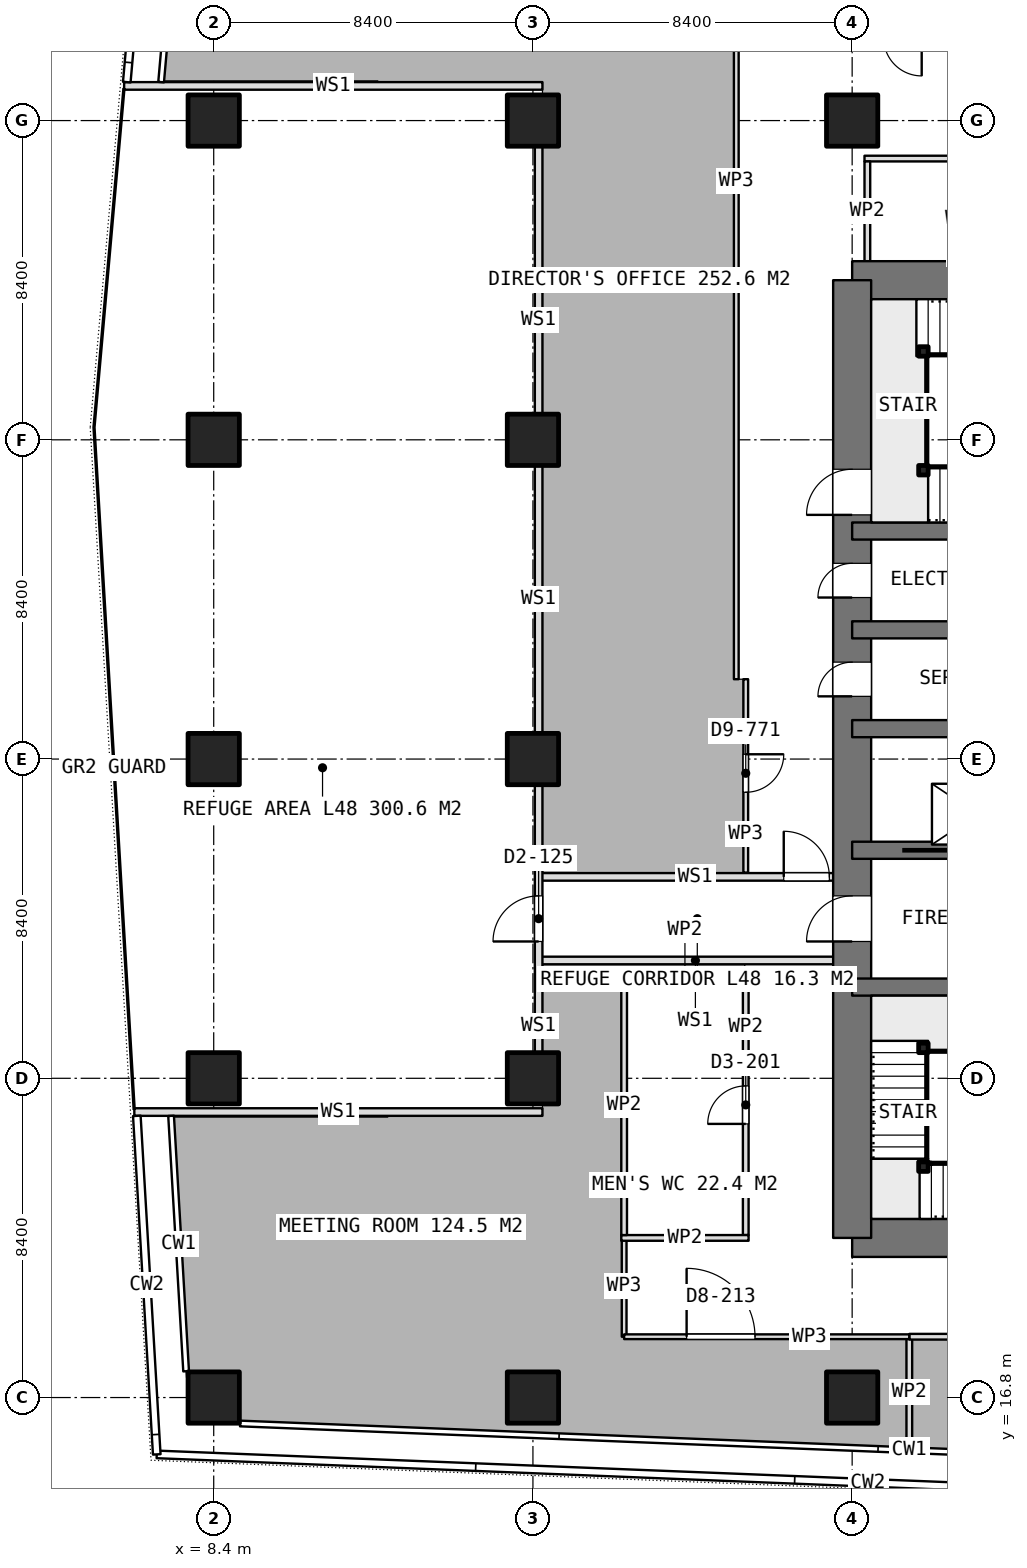
"""IFC4 building model, lengths in metres.
Left out: names, types, materials, properties, quantities, classifications, styles, units other than length and angle.
Written with IfcOpenShell. Run it as: python <this file> out.ifc"""

import sys

from ifc_helpers import new_model, si_unit, direction, frame, frame_2d, origin, origin_2d, place, context, subcontext, project, spatial, rectangle, extrude, element, fill, save


model = new_model("IFC4")
c1 = context("Model", 3, precision=1e-05, world=origin(), true_north=direction((0.0, 1.0)))
c2 = subcontext(c1, "Body", "Model", "MODEL_VIEW")
j1 = project(units=[si_unit("LENGTHUNIT", "METRE"), si_unit("PLANEANGLEUNIT", "RADIAN")], contexts=[c1])
p1 = place(None, origin())
s1 = spatial("IfcSite", under=j1, at=p1, CompositionType="ELEMENT")
p2 = place(p1, origin())
s2 = spatial("IfcBuilding", under=s1, at=p2, CompositionType="ELEMENT")
p3 = place(p2, frame((0.0, 0.0, 191.45)))
s3 = spatial("IfcBuildingStorey", under=s2, at=p3, CompositionType="ELEMENT", Elevation=191.45)
for number, where, z_axis, x_axis in (
    (1, (25.2, 21.0, 0.0), (0.0, 0.0, 1.0), (1.0, 0.0, 0.0)),
    (2, (25.2, 46.2, 0.0), (0.0, 0.0, 1.0), (1.0, 0.0, 0.0)),
):
    element("IfcWall", number, at=place(p3, frame(where, z_axis=z_axis, x_axis=x_axis)), inside=s3, PredefinedType="SHEAR", context=c2, shape_type="SweptSolid", body=[
        extrude(rectangle(XDim=10.4, YDim=1.0, at=frame_2d((5.2, 0.0))), origin(), (0.0, 0.0, 1.0), 3.75),
    ])
p4 = place(p3, frame((25.2, 21.0, 0.0), z_axis=(0.0, 0.0, 1.0), x_axis=(0.0, 1.0, 0.0)))
e3 = element("IfcWall", 3, at=p4, inside=s3, PredefinedType="SHEAR", context=c2, shape_type="SweptSolid", body=[
    extrude(rectangle(XDim=25.2, YDim=1.0, at=frame_2d((12.6, 0.0))), origin(), (0.0, 0.0, 1.0), 3.75),
])
p5 = place(p4, frame((7.8, 0.0, 0.0)))
e4 = element("IfcOpeningElement", 4, at=p5, cuts=e3, PredefinedType="OPENING", context=c2, shape_type="SweptSolid", body=[
    extrude(rectangle(XDim=1.2, YDim=2.1, at=frame_2d((0.6, 1.05))), frame((0.0, 0.51, 0.0), z_axis=(0.0, -1.0, 0.0), x_axis=(1.0, 0.0, 0.0)), (0.0, 0.0, 1.0), 1.02),
])
p6 = place(p4, frame((14.25, 0.0, 0.0)))
e5 = element("IfcOpeningElement", 5, at=p6, cuts=e3, PredefinedType="OPENING", context=c2, shape_type="SweptSolid", body=[
    extrude(rectangle(XDim=0.9, YDim=2.1, at=frame_2d((0.45, 1.05))), frame((0.0, 0.51, 0.0), z_axis=(0.0, -1.0, 0.0), x_axis=(1.0, 0.0, 0.0)), (0.0, 0.0, 1.0), 1.02),
])
p7 = place(p4, frame((16.85, 0.0, 0.0)))
e6 = element("IfcOpeningElement", 6, at=p7, cuts=e3, PredefinedType="OPENING", context=c2, shape_type="SweptSolid", body=[
    extrude(rectangle(XDim=0.9, YDim=2.1, at=frame_2d((0.45, 1.05))), frame((0.0, 0.51, 0.0), z_axis=(0.0, -1.0, 0.0), x_axis=(1.0, 0.0, 0.0)), (0.0, 0.0, 1.0), 1.02),
])
p8 = place(p4, frame((19.025, 0.0, 0.0)))
e7 = element("IfcOpeningElement", 7, at=p8, cuts=e3, PredefinedType="OPENING", context=c2, shape_type="SweptSolid", body=[
    extrude(rectangle(XDim=1.2, YDim=2.1, at=frame_2d((0.6, 1.05))), frame((0.0, 0.51, 0.0), z_axis=(0.0, -1.0, 0.0), x_axis=(1.0, 0.0, 0.0)), (0.0, 0.0, 1.0), 1.02),
])
p9 = place(p3, frame((25.2, 27.6, 0.0), z_axis=(0.0, 0.0, 1.0), x_axis=(1.0, 0.0, 0.0)))
e8 = element("IfcWall", 8, at=p9, inside=s3, PredefinedType="SHEAR", context=c2, shape_type="SweptSolid", body=[
    extrude(rectangle(XDim=6.6, YDim=0.45, at=frame_2d((3.3, 0.0))), origin(), (0.0, 0.0, 1.0), 3.75),
])
p10 = place(p9, frame((4.975, 0.0, 0.0)))
e9 = element("IfcOpeningElement", 9, at=p10, cuts=e8, PredefinedType="OPENING", context=c2, shape_type="SweptSolid", body=[
    extrude(rectangle(XDim=1.2, YDim=2.1, at=frame_2d((0.6, 1.05))), frame((0.0, 0.235, 0.0), z_axis=(0.0, -1.0, 0.0), x_axis=(1.0, 0.0, 0.0)), (0.0, 0.0, 1.0), 0.47),
])
p11 = place(p3, frame((25.2, 31.2, 0.0), z_axis=(0.0, 0.0, 1.0), x_axis=(1.0, 0.0, 0.0)))
e10 = element("IfcWall", 10, at=p11, inside=s3, PredefinedType="SHEAR", context=c2, shape_type="SweptSolid", body=[
    extrude(rectangle(XDim=6.6, YDim=0.45, at=frame_2d((3.3, 0.0))), origin(), (0.0, 0.0, 1.0), 3.75),
])
p12 = place(p11, frame((2.65, 0.0, 0.0)))
e11 = element("IfcOpeningElement", 11, at=p12, cuts=e10, PredefinedType="OPENING", context=c2, shape_type="SweptSolid", body=[
    extrude(rectangle(XDim=1.3, YDim=2.1, at=frame_2d((0.65, 1.05))), frame((0.0, 0.235, 0.0), z_axis=(0.0, -1.0, 0.0), x_axis=(1.0, 0.0, 0.0)), (0.0, 0.0, 1.0), 0.47),
])
for number, where, z_axis, x_axis in (
    (12, (25.2, 34.4, 0.0), (0.0, 0.0, 1.0), (1.0, 0.0, 0.0)),
    (13, (25.2, 37.0, 0.0), (0.0, 0.0, 1.0), (1.0, 0.0, 0.0)),
    (14, (25.2, 39.6, 0.0), (0.0, 0.0, 1.0), (1.0, 0.0, 0.0)),
):
    element("IfcWall", number, at=place(p3, frame(where, z_axis=z_axis, x_axis=x_axis)), inside=s3, PredefinedType="SHEAR", context=c2, shape_type="SweptSolid", body=[
        extrude(rectangle(XDim=6.6, YDim=0.45, at=frame_2d((3.3, 0.0))), origin(), (0.0, 0.0, 1.0), 3.75),
    ])
for number, where, z_axis, x_axis in (
    (15, (8.4, 16.8, 0.0), (0.0, 0.0, 1.0), (1.0, 0.0, 0.0)),
    (16, (8.4, 25.2, 0.0), (0.0, 0.0, 1.0), (1.0, 0.0, 0.0)),
    (17, (8.4, 33.6, 0.0), (0.0, 0.0, 1.0), (1.0, 0.0, 0.0)),
    (18, (8.4, 42.0, 0.0), (0.0, 0.0, 1.0), (1.0, 0.0, 0.0)),
    (19, (8.4, 50.4, 0.0), (0.0, 0.0, 1.0), (1.0, 0.0, 0.0)),
    (20, (16.8, 16.8, 0.0), (0.0, 0.0, 1.0), (1.0, 0.0, 0.0)),
    (21, (16.8, 25.2, 0.0), (0.0, 0.0, 1.0), (1.0, 0.0, 0.0)),
    (22, (16.8, 33.6, 0.0), (0.0, 0.0, 1.0), (1.0, 0.0, 0.0)),
    (23, (16.8, 42.0, 0.0), (0.0, 0.0, 1.0), (1.0, 0.0, 0.0)),
    (24, (16.8, 50.4, 0.0), (0.0, 0.0, 1.0), (1.0, 0.0, 0.0)),
    (25, (25.2, 16.8, 0.0), (0.0, 0.0, 1.0), (1.0, 0.0, 0.0)),
    (26, (25.2, 50.4, 0.0), (0.0, 0.0, 1.0), (1.0, 0.0, 0.0)),
):
    element("IfcColumn", number, at=place(p3, frame(where, z_axis=z_axis, x_axis=x_axis)), inside=s3, PredefinedType="COLUMN", context=c2, shape_type="SweptSolid", body=[
        extrude(rectangle(XDim=1.35, YDim=1.35, at=origin_2d()), origin(), (0.0, 0.0, 1.0), 3.75),
    ])
p13 = place(p3, frame((25.525, 49.4, 0.0), z_axis=(0.0, 0.0, 1.0), x_axis=(1.0, 0.0, 0.0)))
e27 = element("IfcWall", 27, at=p13, inside=s3, PredefinedType="PARTITIONING", context=c2, shape_type="SweptSolid", body=[
    extrude(rectangle(XDim=9.75, YDim=0.15, at=frame_2d((4.875, 0.0))), origin(), (0.0, 0.0, 1.0), 3.5),
])
p14 = place(p13, frame((4.375, 0.0, 0.0)))
e28 = element("IfcOpeningElement", 28, at=p14, cuts=e27, PredefinedType="OPENING", context=c2, shape_type="SweptSolid", body=[
    extrude(rectangle(XDim=1.0, YDim=2.1, at=frame_2d((0.5, 1.05))), frame((0.0, 0.085, 0.0), z_axis=(0.0, -1.0, 0.0), x_axis=(1.0, 0.0, 0.0)), (0.0, 0.0, 1.0), 0.17),
])
p15 = place(p3, frame((25.6, 46.7, 0.0), z_axis=(0.0, 0.0, 1.0), x_axis=(0.0, 1.0, 0.0)))
e29 = element("IfcWall", 29, at=p15, inside=s3, PredefinedType="PARTITIONING", context=c2, shape_type="SweptSolid", body=[
    extrude(rectangle(XDim=2.625, YDim=0.15, at=frame_2d((1.312, 0.0))), origin(), (0.0, 0.0, 1.0), 3.5),
])
for number, where, z_axis, x_axis in (
    (30, (19.125, 21.0, 0.0), (0.0, 0.0, 1.0), (1.0, 0.0, 0.0)),
    (31, (19.125, 28.0, 0.0), (0.0, 0.0, 1.0), (1.0, 0.0, 0.0)),
):
    element("IfcWall", number, at=place(p3, frame(where, z_axis=z_axis, x_axis=x_axis)), inside=s3, PredefinedType="PARTITIONING", context=c2, shape_type="SweptSolid", body=[
        extrude(rectangle(XDim=3.35, YDim=0.15, at=frame_2d((1.675, 0.0))), origin(), (0.0, 0.0, 1.0), 3.5),
    ])
p16 = place(p3, frame((19.2, 21.075, 0.0), z_axis=(0.0, 0.0, 1.0), x_axis=(0.0, 1.0, 0.0)))
e32 = element("IfcWall", 32, at=p16, inside=s3, PredefinedType="PARTITIONING", context=c2, shape_type="SweptSolid", body=[
    extrude(rectangle(XDim=6.85, YDim=0.15, at=frame_2d((3.425, 0.0))), origin(), (0.0, 0.0, 1.0), 3.5),
])
p17 = place(p3, frame((22.4, 21.075, 0.0), z_axis=(0.0, 0.0, 1.0), x_axis=(0.0, 1.0, 0.0)))
e33 = element("IfcWall", 33, at=p17, inside=s3, PredefinedType="PARTITIONING", context=c2, shape_type="SweptSolid", body=[
    extrude(rectangle(XDim=6.85, YDim=0.15, at=frame_2d((3.425, 0.0))), origin(), (0.0, 0.0, 1.0), 3.5),
])
p18 = place(p17, frame((2.925, 0.0, 0.0)))
e34 = element("IfcOpeningElement", 34, at=p18, cuts=e33, PredefinedType="OPENING", context=c2, shape_type="SweptSolid", body=[
    extrude(rectangle(XDim=1.0, YDim=2.1, at=frame_2d((0.5, 1.05))), frame((0.0, 0.085, 0.0), z_axis=(0.0, -1.0, 0.0), x_axis=(1.0, 0.0, 0.0)), (0.0, 0.0, 1.0), 0.17),
])
p19 = place(p3, frame((22.151, 55.88, 0.0), z_axis=(0.0, 0.0, 1.0), x_axis=(0.0, -1.0, 0.0)))
e35 = element("IfcWall", 35, at=p19, inside=s3, PredefinedType="PARTITIONING", context=c2, shape_type="SweptSolid", body=[
    extrude(rectangle(XDim=20.179, YDim=0.125, at=frame_2d((10.089, 0.0))), origin(), (0.0, 0.0, 1.0), 3.5),
])
p20 = place(p3, frame((22.4, 35.701, 0.0), z_axis=(0.0, 0.0, 1.0), x_axis=(0.0, -1.0, 0.0)))
e36 = element("IfcWall", 36, at=p20, inside=s3, PredefinedType="PARTITIONING", context=c2, shape_type="SweptSolid", body=[
    extrude(rectangle(XDim=5.09, YDim=0.125, at=frame_2d((2.545, 0.0))), origin(), (0.0, 0.0, 1.0), 3.5),
])
p21 = place(p20, frame((1.975, 0.0, 0.0)))
e37 = element("IfcOpeningElement", 37, at=p21, cuts=e36, PredefinedType="OPENING", context=c2, shape_type="SweptSolid", body=[
    extrude(rectangle(XDim=1.0, YDim=2.1, at=frame_2d((0.5, 1.05))), frame((0.0, 0.073, 0.0), z_axis=(0.0, -1.0, 0.0), x_axis=(1.0, 0.0, 0.0)), (0.0, 0.0, 1.0), 0.145),
])
p22 = place(p3, frame((26.704, 15.495, 0.0), z_axis=(0.0, 0.0, 1.0), x_axis=(0.0, 1.0, 0.0)))
e38 = element("IfcWall", 38, at=p22, inside=s3, PredefinedType="PARTITIONING", context=c2, shape_type="SweptSolid", body=[
    extrude(rectangle(XDim=2.905, YDim=0.15, at=frame_2d((1.452, 0.0))), origin(), (0.0, 0.0, 1.0), 3.5),
])
p23 = place(p3, frame((26.704, 18.4, 0.0), z_axis=(0.0, 0.0, 1.0), x_axis=(1.0, 0.0, 0.0)))
e39 = element("IfcWall", 39, at=p23, inside=s3, PredefinedType="PARTITIONING", context=c2, shape_type="SweptSolid", body=[
    extrude(rectangle(XDim=8.495, YDim=0.15, at=frame_2d((4.248, 0.0))), origin(), (0.0, 0.0, 1.0), 3.5),
])
p24 = place(p23, frame((3.747, 0.0, 0.0)))
e40 = element("IfcOpeningElement", 40, at=p24, cuts=e39, PredefinedType="OPENING", context=c2, shape_type="SweptSolid", body=[
    extrude(rectangle(XDim=1.0, YDim=2.1, at=frame_2d((0.5, 1.05))), frame((0.0, 0.085, 0.0), z_axis=(0.0, -1.0, 0.0), x_axis=(1.0, 0.0, 0.0)), (0.0, 0.0, 1.0), 0.17),
])
p25 = place(p3, frame((19.2, 21.075, 0.0), z_axis=(0.0, 0.0, 1.0), x_axis=(0.0, -1.0, 0.0)))
e41 = element("IfcWall", 41, at=p25, inside=s3, PredefinedType="PARTITIONING", context=c2, shape_type="SweptSolid", body=[
    extrude(rectangle(XDim=2.675, YDim=0.125, at=frame_2d((1.337, 0.0))), origin(), (0.0, 0.0, 1.0), 3.5),
])
p26 = place(p3, frame((19.2, 18.4, 0.0), z_axis=(0.0, 0.0, 1.0), x_axis=(1.0, 0.0, 0.0)))
e42 = element("IfcWall", 42, at=p26, inside=s3, PredefinedType="PARTITIONING", context=c2, shape_type="SweptSolid", body=[
    extrude(rectangle(XDim=7.503, YDim=0.125, at=frame_2d((3.751, 0.0))), origin(), (0.0, 0.0, 1.0), 3.5),
])
p27 = place(p26, frame((1.644, 0.0, 0.0)))
e43 = element("IfcOpeningElement", 43, at=p27, cuts=e42, PredefinedType="OPENING", context=c2, shape_type="SweptSolid", body=[
    extrude(rectangle(XDim=1.8, YDim=2.1, at=frame_2d((0.9, 1.05))), frame((0.0, 0.073, 0.0), z_axis=(0.0, -1.0, 0.0), x_axis=(1.0, 0.0, 0.0)), (0.0, 0.0, 1.0), 0.145),
])
for number, where, z_axis, x_axis in (
    (44, (27.075, 22.875, 0.0), (0.0, 0.0, 1.0), (1.0, 0.0, 0.0)),
    (45, (27.075, 26.0, 0.0), (0.0, 0.0, 1.0), (1.0, 0.0, 0.0)),
    (46, (27.075, 41.2, 0.0), (0.0, 0.0, 1.0), (1.0, 0.0, 0.0)),
    (47, (27.075, 44.325, 0.0), (0.0, 0.0, 1.0), (1.0, 0.0, 0.0)),
):
    element("IfcColumn", number, at=place(p3, frame(where, z_axis=z_axis, x_axis=x_axis)), inside=s3, PredefinedType="COLUMN", context=c2, shape_type="SweptSolid", body=[
        extrude(rectangle(XDim=0.25, YDim=0.25, at=origin_2d()), origin(), (0.0, 0.0, 1.0), 3.75),
    ])
p28 = place(p3, frame((16.95, 25.875, 0.0), z_axis=(0.0, 0.0, 1.0), x_axis=(0.0, 1.0, 0.0)))
e48 = element("IfcWall", 48, at=p28, inside=s3, PredefinedType="PARTITIONING", context=c2, shape_type="SweptSolid", body=[
    extrude(rectangle(XDim=7.05, YDim=0.2, at=frame_2d((3.525, 0.0))), origin(), (0.0, 0.0, 1.0), 3.5),
])
p29 = place(p28, frame((2.925, 0.0, 0.0)))
e49 = element("IfcOpeningElement", 49, at=p29, cuts=e48, PredefinedType="OPENING", context=c2, shape_type="SweptSolid", body=[
    extrude(rectangle(XDim=1.2, YDim=2.1, at=frame_2d((0.6, 1.05))), frame((0.0, 0.11, 0.0), z_axis=(0.0, -1.0, 0.0), x_axis=(1.0, 0.0, 0.0)), (0.0, 0.0, 1.0), 0.22),
])
for number, where, z_axis, x_axis in (
    (50, (16.95, 34.275, 0.0), (0.0, 0.0, 1.0), (0.0, 1.0, 0.0)),
    (51, (16.95, 42.675, 0.0), (0.0, 0.0, 1.0), (0.0, 1.0, 0.0)),
):
    element("IfcWall", number, at=place(p3, frame(where, z_axis=z_axis, x_axis=x_axis)), inside=s3, PredefinedType="PARTITIONING", context=c2, shape_type="SweptSolid", body=[
        extrude(rectangle(XDim=7.05, YDim=0.2, at=frame_2d((3.525, 0.0))), origin(), (0.0, 0.0, 1.0), 3.5),
    ])
p30 = place(p3, frame((6.311, 24.312, 0.0), z_axis=(0.0, 0.0, 1.0), x_axis=(1.0, 0.0, 0.0)))
e52 = element("IfcWall", 52, at=p30, inside=s3, PredefinedType="PARTITIONING", context=c2, shape_type="SweptSolid", body=[
    extrude(rectangle(XDim=10.739, YDim=0.2, at=frame_2d((5.37, 0.0))), origin(), (0.0, 0.0, 1.0), 3.5),
])
p31 = place(p3, frame((6.043, 51.312, 0.0), z_axis=(0.0, 0.0, 1.0), x_axis=(1.0, 0.0, 0.0)))
e53 = element("IfcWall", 53, at=p31, inside=s3, PredefinedType="PARTITIONING", context=c2, shape_type="SweptSolid", body=[
    extrude(rectangle(XDim=11.007, YDim=0.2, at=frame_2d((5.503, 0.0))), origin(), (0.0, 0.0, 1.0), 3.5),
])
p32 = place(p3, frame((16.95, 30.5, 0.0), z_axis=(0.0, 0.0, 1.0), x_axis=(1.0, 0.0, 0.0)))
e54 = element("IfcWall", 54, at=p32, inside=s3, PredefinedType="PARTITIONING", context=c2, shape_type="SweptSolid", body=[
    extrude(rectangle(XDim=8.25, YDim=0.2, at=frame_2d((4.125, 0.0))), origin(), (0.0, 0.0, 1.0), 3.5),
])
p33 = place(p32, frame((6.45, 0.0, 0.0)))
e55 = element("IfcOpeningElement", 55, at=p33, cuts=e54, PredefinedType="OPENING", context=c2, shape_type="SweptSolid", body=[
    extrude(rectangle(XDim=1.2, YDim=2.1, at=frame_2d((0.6, 1.05))), frame((0.0, 0.11, 0.0), z_axis=(0.0, -1.0, 0.0), x_axis=(1.0, 0.0, 0.0)), (0.0, 0.0, 1.0), 0.22),
])
p34 = place(p3, frame((16.95, 28.3, 0.0), z_axis=(0.0, 0.0, 1.0), x_axis=(1.0, 0.0, 0.0)))
e56 = element("IfcWall", 56, at=p34, inside=s3, PredefinedType="PARTITIONING", context=c2, shape_type="SweptSolid", body=[
    extrude(rectangle(XDim=8.25, YDim=0.2, at=frame_2d((4.125, 0.0))), origin(), (0.0, 0.0, 1.0), 3.5),
])
p35 = place(p5, origin())
e57 = element("IfcDoor", 57, at=p35, inside=s3, OperationType="SINGLE_SWING_LEFT", PredefinedType="DOOR", context=c2, shape_type="SweptSolid", body=[
    extrude(rectangle(XDim=1.2, YDim=2.1, at=frame_2d((0.6, 1.05))), frame((0.0, 0.025, 0.0), z_axis=(0.0, -1.0, 0.0), x_axis=(1.0, 0.0, 0.0)), (0.0, 0.0, 1.0), 0.05),
])
fill(e4, e57)
p36 = place(p6, origin())
e58 = element("IfcDoor", 58, at=p36, inside=s3, OperationType="SINGLE_SWING_LEFT", PredefinedType="DOOR", context=c2, shape_type="SweptSolid", body=[
    extrude(rectangle(XDim=0.9, YDim=2.1, at=frame_2d((0.45, 1.05))), frame((0.0, 0.025, 0.0), z_axis=(0.0, -1.0, 0.0), x_axis=(1.0, 0.0, 0.0)), (0.0, 0.0, 1.0), 0.05),
])
fill(e5, e58)
p37 = place(p7, origin())
e59 = element("IfcDoor", 59, at=p37, inside=s3, OperationType="SINGLE_SWING_LEFT", PredefinedType="DOOR", context=c2, shape_type="SweptSolid", body=[
    extrude(rectangle(XDim=0.9, YDim=2.1, at=frame_2d((0.45, 1.05))), frame((0.0, 0.025, 0.0), z_axis=(0.0, -1.0, 0.0), x_axis=(1.0, 0.0, 0.0)), (0.0, 0.0, 1.0), 0.05),
])
fill(e6, e59)
p38 = place(p18, origin())
e60 = element("IfcDoor", 60, at=p38, inside=s3, OperationType="SINGLE_SWING_LEFT", PredefinedType="DOOR", context=c2, shape_type="SweptSolid", body=[
    extrude(rectangle(XDim=1.0, YDim=2.1, at=frame_2d((0.5, 1.05))), frame((0.0, 0.025, 0.0), z_axis=(0.0, -1.0, 0.0), x_axis=(1.0, 0.0, 0.0)), (0.0, 0.0, 1.0), 0.05),
])
fill(e34, e60)
p39 = place(p21, origin())
e61 = element("IfcDoor", 61, at=p39, inside=s3, OperationType="SINGLE_SWING_LEFT", PredefinedType="DOOR", context=c2, shape_type="SweptSolid", body=[
    extrude(rectangle(XDim=1.0, YDim=2.1, at=frame_2d((0.5, 1.05))), frame((0.0, 0.025, 0.0), z_axis=(0.0, -1.0, 0.0), x_axis=(1.0, 0.0, 0.0)), (0.0, 0.0, 1.0), 0.05),
])
fill(e37, e61)
p40 = place(p27, origin())
e62 = element("IfcDoor", 62, at=p40, inside=s3, OperationType="DOUBLE_DOOR_SINGLE_SWING", PredefinedType="DOOR", context=c2, shape_type="SweptSolid", body=[
    extrude(rectangle(XDim=1.8, YDim=2.1, at=frame_2d((0.9, 1.05))), frame((0.0, 0.025, 0.0), z_axis=(0.0, -1.0, 0.0), x_axis=(1.0, 0.0, 0.0)), (0.0, 0.0, 1.0), 0.05),
])
fill(e43, e62)
p41 = place(p8, origin())
e63 = element("IfcDoor", 63, at=p41, inside=s3, OperationType="SINGLE_SWING_RIGHT", PredefinedType="DOOR", context=c2, shape_type="SweptSolid", body=[
    extrude(rectangle(XDim=1.2, YDim=2.1, at=frame_2d((0.6, 1.05))), frame((0.0, 0.025, 0.0), z_axis=(0.0, -1.0, 0.0), x_axis=(1.0, 0.0, 0.0)), (0.0, 0.0, 1.0), 0.05),
])
fill(e7, e63)
p42 = place(p29, origin())
e64 = element("IfcDoor", 64, at=p42, inside=s3, OperationType="SINGLE_SWING_LEFT", PredefinedType="DOOR", context=c2, shape_type="SweptSolid", body=[
    extrude(rectangle(XDim=1.2, YDim=2.1, at=frame_2d((0.6, 1.05))), frame((0.0, 0.025, 0.0), z_axis=(0.0, -1.0, 0.0), x_axis=(1.0, 0.0, 0.0)), (0.0, 0.0, 1.0), 0.05),
])
fill(e49, e64)
p43 = place(p33, origin())
e65 = element("IfcDoor", 65, at=p43, inside=s3, OperationType="SINGLE_SWING_LEFT", PredefinedType="DOOR", context=c2, shape_type="SweptSolid", body=[
    extrude(rectangle(XDim=1.2, YDim=2.1, at=frame_2d((0.6, 1.05))), frame((0.0, 0.025, 0.0), z_axis=(0.0, -1.0, 0.0), x_axis=(1.0, 0.0, 0.0)), (0.0, 0.0, 1.0), 0.05),
])
fill(e55, e65)
save(model, sys.argv[1])
